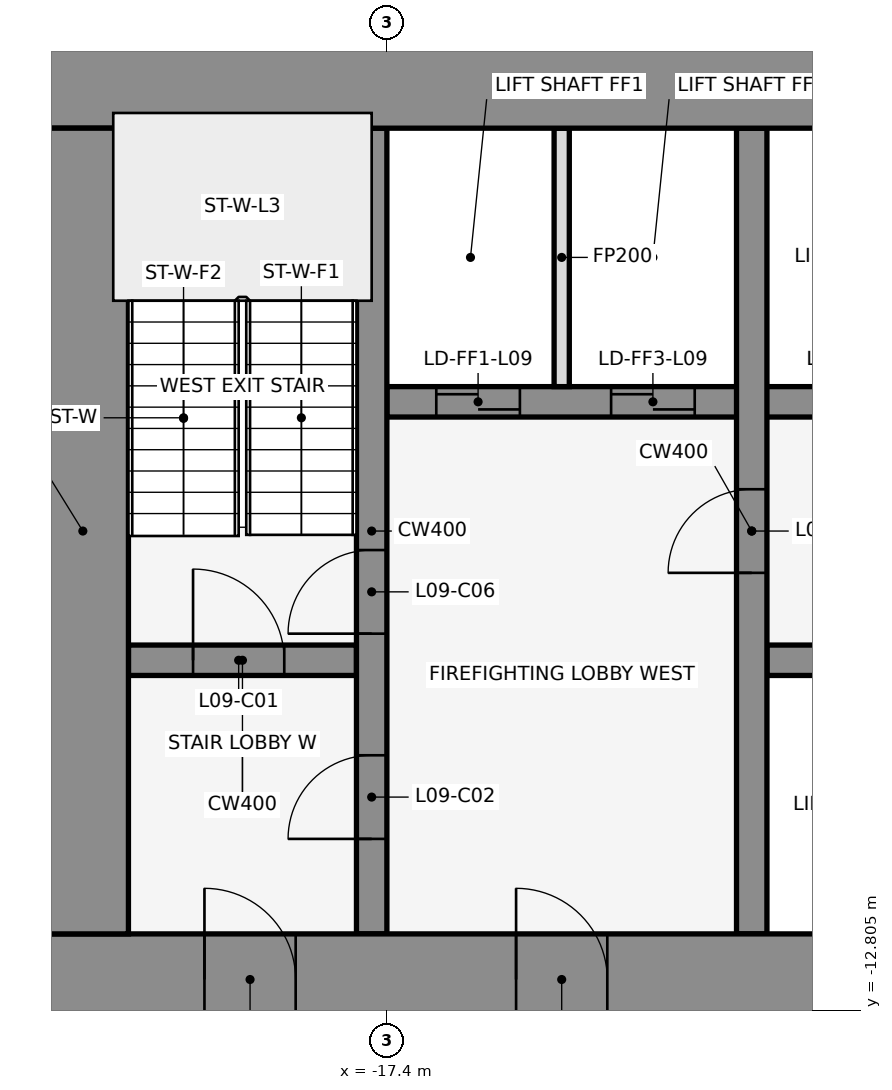
"""IFC4 building model, lengths in metres.
Left out: names, types, materials, properties, quantities, classifications, styles, units other than length and angle.
Written with IfcOpenShell. Run it as: python <this file> out.ifc"""

import sys

from ifc_helpers import new_model, si_unit, direction, frame, frame_2d, origin, place, context, subcontext, project, spatial, rectangle, extrude, element, fill, save


model = new_model("IFC4")
c1 = context("Model", 3, precision=1e-05, world=origin(), true_north=direction((0.0, 1.0)))
c2 = subcontext(c1, "Body", "Model", "MODEL_VIEW")
j1 = project(units=[si_unit("LENGTHUNIT", "METRE"), si_unit("PLANEANGLEUNIT", "RADIAN")], contexts=[c1])
p1 = place(None, origin())
s1 = spatial("IfcSite", under=j1, at=p1, CompositionType="ELEMENT")
p2 = place(p1, origin())
s2 = spatial("IfcBuilding", under=s1, at=p2, CompositionType="ELEMENT")
p3 = place(p2, frame((0.0, 0.0, 48.5)))
s3 = spatial("IfcBuildingStorey", under=s2, at=p3, CompositionType="ELEMENT", Elevation=48.5)
p4 = place(p3, frame((-14.599, 1.08, 0.0), z_axis=(0.0, 0.0, 1.0), x_axis=(-0.83981312244, -0.542875602121, 0.0)))
e1 = element("IfcWall", 1, at=p4, inside=s3, PredefinedType="STANDARD", context=c2, shape_type="SweptSolid", body=[
    extrude(rectangle(XDim=2.183, YDim=0.25, at=frame_2d((1.091, 0.0))), origin(), (0.0, 0.0, 1.0), 4.35),
])
p5 = place(p3, frame((-20.8, -8.2, 0.0), z_axis=(0.0, 0.0, 1.0), x_axis=(1.0, 0.0, 0.0)))
e2 = element("IfcWall", 2, at=p5, inside=s3, PredefinedType="SHEAR", context=c2, shape_type="SweptSolid", body=[
    extrude(rectangle(XDim=3.0, YDim=0.4, at=frame_2d((1.5, 0.0))), origin(), (0.0, 0.0, 1.0), 4.5),
])
p6 = place(p5, frame((0.85, 0.0, 0.0)))
e3 = element("IfcOpeningElement", 3, at=p6, cuts=e2, PredefinedType="OPENING", context=c2, shape_type="SweptSolid", body=[
    extrude(rectangle(XDim=1.2, YDim=2.1, at=frame_2d((0.6, 1.05))), frame((0.0, 0.212, 0.0), z_axis=(0.0, -1.0, 0.0), x_axis=(1.0, 0.0, 0.0)), (0.0, 0.0, 1.0), 0.424),
])
p7 = place(p3, frame((-12.4, -8.2, 0.0), z_axis=(0.0, 0.0, 1.0), x_axis=(1.0, 0.0, 0.0)))
e4 = element("IfcWall", 4, at=p7, inside=s3, PredefinedType="SHEAR", context=c2, shape_type="SweptSolid", body=[
    extrude(rectangle(XDim=6.0, YDim=0.4, at=frame_2d((3.0, 0.0))), origin(), (0.0, 0.0, 1.0), 4.5),
])
p8 = place(p3, frame((-17.4, -4.8, 0.0), z_axis=(0.0, 0.0, 1.0), x_axis=(1.0, 0.0, 0.0)))
e5 = element("IfcWall", 5, at=p8, inside=s3, PredefinedType="SHEAR", context=c2, shape_type="SweptSolid", body=[
    extrude(rectangle(XDim=13.6, YDim=0.4, at=frame_2d((6.8, 0.0))), origin(), (0.0, 0.0, 1.0), 4.5),
])
p9 = place(p8, frame((0.65, 0.0, 0.0)))
e6 = element("IfcOpeningElement", 6, at=p9, cuts=e5, PredefinedType="OPENING", context=c2, shape_type="SweptSolid", body=[
    extrude(rectangle(XDim=1.1, YDim=2.1, at=frame_2d((0.55, 1.05))), frame((0.0, 0.212, 0.0), z_axis=(0.0, -1.0, 0.0), x_axis=(1.0, 0.0, 0.0)), (0.0, 0.0, 1.0), 0.424),
])
p10 = place(p8, frame((2.95, 0.0, 0.0)))
e7 = element("IfcOpeningElement", 7, at=p10, cuts=e5, PredefinedType="OPENING", context=c2, shape_type="SweptSolid", body=[
    extrude(rectangle(XDim=1.1, YDim=2.1, at=frame_2d((0.55, 1.05))), frame((0.0, 0.212, 0.0), z_axis=(0.0, -1.0, 0.0), x_axis=(1.0, 0.0, 0.0)), (0.0, 0.0, 1.0), 0.424),
])
p11 = place(p8, frame((5.65, 0.0, 0.0)))
e8 = element("IfcOpeningElement", 8, at=p11, cuts=e5, PredefinedType="OPENING", context=c2, shape_type="SweptSolid", body=[
    extrude(rectangle(XDim=1.2, YDim=2.1, at=frame_2d((0.6, 1.05))), frame((0.0, 0.212, 0.0), z_axis=(0.0, -1.0, 0.0), x_axis=(1.0, 0.0, 0.0)), (0.0, 0.0, 1.0), 0.424),
])
p12 = place(p8, frame((8.65, 0.0, 0.0)))
e9 = element("IfcOpeningElement", 9, at=p12, cuts=e5, PredefinedType="OPENING", context=c2, shape_type="SweptSolid", body=[
    extrude(rectangle(XDim=1.2, YDim=2.1, at=frame_2d((0.6, 1.05))), frame((0.0, 0.212, 0.0), z_axis=(0.0, -1.0, 0.0), x_axis=(1.0, 0.0, 0.0)), (0.0, 0.0, 1.0), 0.424),
])
p13 = place(p8, frame((11.65, 0.0, 0.0)))
e10 = element("IfcOpeningElement", 10, at=p13, cuts=e5, PredefinedType="OPENING", context=c2, shape_type="SweptSolid", body=[
    extrude(rectangle(XDim=1.2, YDim=2.1, at=frame_2d((0.6, 1.05))), frame((0.0, 0.212, 0.0), z_axis=(0.0, -1.0, 0.0), x_axis=(1.0, 0.0, 0.0)), (0.0, 0.0, 1.0), 0.424),
])
p14 = place(p3, frame((-17.6, -11.8, 0.0), z_axis=(0.0, 0.0, 1.0), x_axis=(0.0, 1.0, 0.0)))
e11 = element("IfcWall", 11, at=p14, inside=s3, PredefinedType="SHEAR", context=c2, shape_type="SweptSolid", body=[
    extrude(rectangle(XDim=10.6, YDim=0.4, at=frame_2d((5.3, 0.0))), origin(), (0.0, 0.0, 1.0), 4.5),
])
p15 = place(p14, frame((1.25, 0.0, 0.0)))
e12 = element("IfcOpeningElement", 12, at=p15, cuts=e11, PredefinedType="OPENING", context=c2, shape_type="SweptSolid", body=[
    extrude(rectangle(XDim=1.1, YDim=2.1, at=frame_2d((0.55, 1.05))), frame((0.0, 0.212, 0.0), z_axis=(0.0, -1.0, 0.0), x_axis=(1.0, 0.0, 0.0)), (0.0, 0.0, 1.0), 0.424),
])
p16 = place(p14, frame((3.95, 0.0, 0.0)))
e13 = element("IfcOpeningElement", 13, at=p16, cuts=e11, PredefinedType="OPENING", context=c2, shape_type="SweptSolid", body=[
    extrude(rectangle(XDim=1.1, YDim=2.1, at=frame_2d((0.55, 1.05))), frame((0.0, 0.212, 0.0), z_axis=(0.0, -1.0, 0.0), x_axis=(1.0, 0.0, 0.0)), (0.0, 0.0, 1.0), 0.424),
])
p17 = place(p3, frame((-15.1, -4.6, 0.0), z_axis=(0.0, 0.0, 1.0), x_axis=(0.0, 1.0, 0.0)))
e14 = element("IfcWall", 14, at=p17, inside=s3, PredefinedType="PARTITIONING", context=c2, shape_type="SweptSolid", body=[
    extrude(rectangle(XDim=3.4, YDim=0.2, at=frame_2d((1.7, 0.0))), origin(), (0.0, 0.0, 1.0), 3.418),
])
p18 = place(p3, frame((-12.6, -11.8, 0.0), z_axis=(0.0, 0.0, 1.0), x_axis=(0.0, 1.0, 0.0)))
e15 = element("IfcWall", 15, at=p18, inside=s3, PredefinedType="SHEAR", context=c2, shape_type="SweptSolid", body=[
    extrude(rectangle(XDim=10.6, YDim=0.4, at=frame_2d((5.3, 0.0))), origin(), (0.0, 0.0, 1.0), 4.5),
])
p19 = place(p18, frame((4.75, 0.0, 0.0)))
e16 = element("IfcOpeningElement", 16, at=p19, cuts=e15, PredefinedType="OPENING", context=c2, shape_type="SweptSolid", body=[
    extrude(rectangle(XDim=1.1, YDim=2.1, at=frame_2d((0.55, 1.05))), frame((0.0, 0.212, 0.0), z_axis=(0.0, -1.0, 0.0), x_axis=(1.0, 0.0, 0.0)), (0.0, 0.0, 1.0), 0.424),
])
p20 = place(p3, frame((-22.0, -0.6, 0.0), z_axis=(0.0, 0.0, 1.0), x_axis=(1.0, 0.0, 0.0)))
e17 = element("IfcWall", 17, at=p20, inside=s3, PredefinedType="SHEAR", context=c2, shape_type="SweptSolid", body=[
    extrude(rectangle(XDim=44.0, YDim=1.2, at=frame_2d((22.0, 0.0))), origin(), (0.0, 0.0, 1.0), 4.5),
])
p21 = place(p20, frame((18.55, 0.0, 0.0)))
e18 = element("IfcOpeningElement", 18, at=p21, cuts=e17, PredefinedType="OPENING", context=c2, shape_type="SweptSolid", body=[
    extrude(rectangle(XDim=0.9, YDim=2.1, at=frame_2d((0.45, 1.05))), frame((0.0, 0.612, 0.0), z_axis=(0.0, -1.0, 0.0), x_axis=(1.0, 0.0, 0.0)), (0.0, 0.0, 1.0), 1.224),
])
p22 = place(p20, frame((24.55, 0.0, 0.0)))
e19 = element("IfcOpeningElement", 19, at=p22, cuts=e17, PredefinedType="OPENING", context=c2, shape_type="SweptSolid", body=[
    extrude(rectangle(XDim=0.9, YDim=2.1, at=frame_2d((0.45, 1.05))), frame((0.0, 0.612, 0.0), z_axis=(0.0, -1.0, 0.0), x_axis=(1.0, 0.0, 0.0)), (0.0, 0.0, 1.0), 1.224),
])
p23 = place(p3, frame((-22.0, -12.4, 0.0), z_axis=(0.0, 0.0, 1.0), x_axis=(1.0, 0.0, 0.0)))
e20 = element("IfcWall", 20, at=p23, inside=s3, PredefinedType="SHEAR", context=c2, shape_type="SweptSolid", body=[
    extrude(rectangle(XDim=44.0, YDim=1.2, at=frame_2d((22.0, 0.0))), origin(), (0.0, 0.0, 1.0), 4.5),
])
p24 = place(p23, frame((2.2, 0.0, 0.0)))
e21 = element("IfcOpeningElement", 21, at=p24, cuts=e20, PredefinedType="OPENING", context=c2, shape_type="SweptSolid", body=[
    extrude(rectangle(XDim=1.2, YDim=2.1, at=frame_2d((0.6, 1.05))), frame((0.0, 0.612, 0.0), z_axis=(0.0, -1.0, 0.0), x_axis=(1.0, 0.0, 0.0)), (0.0, 0.0, 1.0), 1.224),
])
p25 = place(p23, frame((21.4, 0.0, 0.0)))
e22 = element("IfcOpeningElement", 22, at=p25, cuts=e20, PredefinedType="OPENING", context=c2, shape_type="SweptSolid", body=[
    extrude(rectangle(XDim=1.2, YDim=2.1, at=frame_2d((0.6, 1.05))), frame((0.0, 0.612, 0.0), z_axis=(0.0, -1.0, 0.0), x_axis=(1.0, 0.0, 0.0)), (0.0, 0.0, 1.0), 1.224),
])
p26 = place(p23, frame((40.6, 0.0, 0.0)))
e23 = element("IfcOpeningElement", 23, at=p26, cuts=e20, PredefinedType="OPENING", context=c2, shape_type="SweptSolid", body=[
    extrude(rectangle(XDim=1.2, YDim=2.1, at=frame_2d((0.6, 1.05))), frame((0.0, 0.612, 0.0), z_axis=(0.0, -1.0, 0.0), x_axis=(1.0, 0.0, 0.0)), (0.0, 0.0, 1.0), 1.224),
])
p27 = place(p23, frame((16.0, 0.0, 0.0)))
e24 = element("IfcOpeningElement", 24, at=p27, cuts=e20, PredefinedType="OPENING", context=c2, shape_type="SweptSolid", body=[
    extrude(rectangle(XDim=1.8, YDim=2.1, at=frame_2d((0.9, 1.05))), frame((0.0, 0.612, 0.0), z_axis=(0.0, -1.0, 0.0), x_axis=(1.0, 0.0, 0.0)), (0.0, 0.0, 1.0), 1.224),
])
p28 = place(p23, frame((6.3, 0.0, 0.0)))
e25 = element("IfcOpeningElement", 25, at=p28, cuts=e20, PredefinedType="OPENING", context=c2, shape_type="SweptSolid", body=[
    extrude(rectangle(XDim=1.2, YDim=2.1, at=frame_2d((0.6, 1.05))), frame((0.0, 0.612, 0.0), z_axis=(0.0, -1.0, 0.0), x_axis=(1.0, 0.0, 0.0)), (0.0, 0.0, 1.0), 1.224),
])
p29 = place(p23, frame((26.2, 0.0, 0.0)))
e26 = element("IfcOpeningElement", 26, at=p29, cuts=e20, PredefinedType="OPENING", context=c2, shape_type="SweptSolid", body=[
    extrude(rectangle(XDim=1.8, YDim=2.1, at=frame_2d((0.9, 1.05))), frame((0.0, 0.612, 0.0), z_axis=(0.0, -1.0, 0.0), x_axis=(1.0, 0.0, 0.0)), (0.0, 0.0, 1.0), 1.224),
])
p30 = place(p23, frame((36.5, 0.0, 0.0)))
e27 = element("IfcOpeningElement", 27, at=p30, cuts=e20, PredefinedType="OPENING", context=c2, shape_type="SweptSolid", body=[
    extrude(rectangle(XDim=1.2, YDim=2.1, at=frame_2d((0.6, 1.05))), frame((0.0, 0.612, 0.0), z_axis=(0.0, -1.0, 0.0), x_axis=(1.0, 0.0, 0.0)), (0.0, 0.0, 1.0), 1.224),
])
p31 = place(p3, frame((-21.4, -11.8, 0.0), z_axis=(0.0, 0.0, 1.0), x_axis=(0.0, 1.0, 0.0)))
e28 = element("IfcWall", 28, at=p31, inside=s3, PredefinedType="SHEAR", context=c2, shape_type="SweptSolid", body=[
    extrude(rectangle(XDim=10.6, YDim=1.2, at=frame_2d((5.3, 0.0))), origin(), (0.0, 0.0, 1.0), 4.5),
])
p32 = place(p6, origin())
e29 = element("IfcDoor", 29, at=p32, inside=s3, OperationType="SINGLE_SWING_LEFT", PredefinedType="DOOR", context=c2, shape_type="SweptSolid", body=[
    extrude(rectangle(XDim=1.2, YDim=2.1, at=frame_2d((0.6, 1.05))), frame((0.0, 0.025, 0.0), z_axis=(0.0, -1.0, 0.0), x_axis=(1.0, 0.0, 0.0)), (0.0, 0.0, 1.0), 0.05),
])
fill(e3, e29)
p33 = place(p15, frame((1.1, 0.0, 0.0), z_axis=(0.0, 0.0, 1.0), x_axis=(-1.0, 0.0, 0.0)))
e30 = element("IfcDoor", 30, at=p33, inside=s3, OperationType="SINGLE_SWING_LEFT", PredefinedType="DOOR", context=c2, shape_type="SweptSolid", body=[
    extrude(rectangle(XDim=1.1, YDim=2.1, at=frame_2d((0.55, 1.05))), frame((0.0, 0.025, 0.0), z_axis=(0.0, -1.0, 0.0), x_axis=(1.0, 0.0, 0.0)), (0.0, 0.0, 1.0), 0.05),
])
fill(e12, e30)
p34 = place(p9, origin())
e31 = element("IfcDoor", 31, at=p34, inside=s3, OperationType="DOUBLE_DOOR_SLIDING", PredefinedType="DOOR", context=c2, shape_type="SweptSolid", body=[
    extrude(rectangle(XDim=1.1, YDim=2.1, at=frame_2d((0.55, 1.05))), frame((0.0, 0.025, 0.0), z_axis=(0.0, -1.0, 0.0), x_axis=(1.0, 0.0, 0.0)), (0.0, 0.0, 1.0), 0.05),
])
fill(e6, e31)
p35 = place(p10, origin())
e32 = element("IfcDoor", 32, at=p35, inside=s3, OperationType="DOUBLE_DOOR_SLIDING", PredefinedType="DOOR", context=c2, shape_type="SweptSolid", body=[
    extrude(rectangle(XDim=1.1, YDim=2.1, at=frame_2d((0.55, 1.05))), frame((0.0, 0.025, 0.0), z_axis=(0.0, -1.0, 0.0), x_axis=(1.0, 0.0, 0.0)), (0.0, 0.0, 1.0), 0.05),
])
fill(e7, e32)
p36 = place(p16, frame((1.1, 0.0, 0.0), z_axis=(0.0, 0.0, 1.0), x_axis=(-1.0, 0.0, 0.0)))
e33 = element("IfcDoor", 33, at=p36, inside=s3, OperationType="SINGLE_SWING_LEFT", PredefinedType="DOOR", context=c2, shape_type="SweptSolid", body=[
    extrude(rectangle(XDim=1.1, YDim=2.1, at=frame_2d((0.55, 1.05))), frame((0.0, 0.025, 0.0), z_axis=(0.0, -1.0, 0.0), x_axis=(1.0, 0.0, 0.0)), (0.0, 0.0, 1.0), 0.05),
])
fill(e13, e33)
p37 = place(p19, origin())
e34 = element("IfcDoor", 34, at=p37, inside=s3, OperationType="SINGLE_SWING_LEFT", PredefinedType="DOOR", context=c2, shape_type="SweptSolid", body=[
    extrude(rectangle(XDim=1.1, YDim=2.1, at=frame_2d((0.55, 1.05))), frame((0.0, 0.025, 0.0), z_axis=(0.0, -1.0, 0.0), x_axis=(1.0, 0.0, 0.0)), (0.0, 0.0, 1.0), 0.05),
])
fill(e16, e34)
p38 = place(p24, frame((1.2, 0.0, 0.0), z_axis=(0.0, 0.0, 1.0), x_axis=(-1.0, 0.0, 0.0)))
e35 = element("IfcDoor", 35, at=p38, inside=s3, OperationType="SINGLE_SWING_RIGHT", PredefinedType="DOOR", context=c2, shape_type="SweptSolid", body=[
    extrude(rectangle(XDim=1.2, YDim=2.1, at=frame_2d((0.6, 1.05))), frame((0.0, 0.025, 0.0), z_axis=(0.0, -1.0, 0.0), x_axis=(1.0, 0.0, 0.0)), (0.0, 0.0, 1.0), 0.05),
])
fill(e21, e35)
p39 = place(p28, frame((1.2, 0.0, 0.0), z_axis=(0.0, 0.0, 1.0), x_axis=(-1.0, 0.0, 0.0)))
e36 = element("IfcDoor", 36, at=p39, inside=s3, OperationType="SINGLE_SWING_RIGHT", PredefinedType="DOOR", context=c2, shape_type="SweptSolid", body=[
    extrude(rectangle(XDim=1.2, YDim=2.1, at=frame_2d((0.6, 1.05))), frame((0.0, 0.025, 0.0), z_axis=(0.0, -1.0, 0.0), x_axis=(1.0, 0.0, 0.0)), (0.0, 0.0, 1.0), 0.05),
])
fill(e25, e36)
save(model, sys.argv[1])
